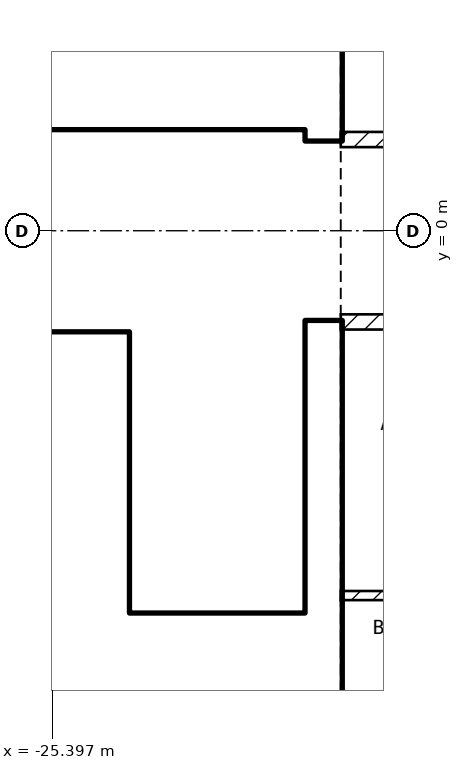
"""IFC4 building model, lengths in metres.
Left out: names, types, materials, properties, quantities, classifications, styles, units other than length and angle.
Written with IfcOpenShell. Run it as: python <this file> out.ifc"""

import sys

from ifc_helpers import new_model, si_unit, direction, frame, frame_2d, origin, place, context, subcontext, project, spatial, rectangle, extrude, element, fill, save


model = new_model("IFC4")
c1 = context("Model", 3, precision=1e-05, world=origin(), true_north=direction((0.0, 1.0)))
c2 = subcontext(c1, "Body", "Model", "MODEL_VIEW")
j1 = project(units=[si_unit("LENGTHUNIT", "METRE"), si_unit("PLANEANGLEUNIT", "RADIAN")], contexts=[c1])
p1 = place(None, origin())
s1 = spatial("IfcSite", under=j1, at=p1, CompositionType="ELEMENT")
p2 = place(p1, origin())
s2 = spatial("IfcBuilding", under=s1, at=p2, CompositionType="ELEMENT")
p3 = place(p2, frame((0.0, 0.0, 253.5)))
s3 = spatial("IfcBuildingStorey", under=s2, at=p3, CompositionType="ELEMENT", Elevation=253.5)
for number, where, z_axis, x_axis in (
    (1, (-21.825, -8.1, 0.0), (0.0, 0.0, 1.0), (0.0, 1.0, 0.0)),
    (2, (-21.825, 1.2, 0.0), (0.0, 0.0, 1.0), (0.0, 1.0, 0.0)),
):
    element("IfcWall", number, at=place(p3, frame(where, z_axis=z_axis, x_axis=x_axis)), inside=s3, PredefinedType="SHEAR", context=c2, shape_type="SweptSolid", body=[
        extrude(rectangle(XDim=6.9, YDim=0.45, at=frame_2d((3.45, 0.0))), origin(), (0.0, 0.0, 1.0), 3.25),
    ])
p4 = place(p3, frame((-33.35, 1.45, 0.0), z_axis=(0.0, 0.0, 1.0), x_axis=(1.0, 0.0, 0.0)))
e3 = element("IfcWall", 3, at=p4, inside=s3, PredefinedType="SOLIDWALL", context=c2, shape_type="SweptSolid", body=[
    extrude(rectangle(XDim=11.3, YDim=0.2, at=frame_2d((5.65, 0.0))), origin(), (0.0, 0.0, 1.0), 3.25),
])
p5 = place(p4, frame((9.55, 0.0, 0.0)))
e4 = element("IfcOpeningElement", 4, at=p5, cuts=e3, PredefinedType="OPENING", context=c2, shape_type="SweptSolid", body=[
    extrude(rectangle(XDim=1.0, YDim=2.1, at=frame_2d((0.5, 1.05))), frame((0.0, 0.11, 0.0), z_axis=(0.0, -1.0, 0.0), x_axis=(1.0, 0.0, 0.0)), (0.0, 0.0, 1.0), 0.22),
])
p6 = place(p4, frame((7.05, 0.0, 0.0)))
e5 = element("IfcOpeningElement", 5, at=p6, cuts=e3, PredefinedType="OPENING", context=c2, shape_type="SweptSolid", body=[
    extrude(rectangle(XDim=1.0, YDim=2.1, at=frame_2d((0.5, 1.05))), frame((0.0, 0.11, 0.0), z_axis=(0.0, -1.0, 0.0), x_axis=(1.0, 0.0, 0.0)), (0.0, 0.0, 1.0), 0.22),
])
p7 = place(p4, frame((1.175, 0.0, 0.0)))
e6 = element("IfcOpeningElement", 6, at=p7, cuts=e3, PredefinedType="OPENING", context=c2, shape_type="SweptSolid", body=[
    extrude(rectangle(XDim=0.9, YDim=2.1, at=frame_2d((0.45, 1.05))), frame((0.0, 0.11, 0.0), z_axis=(0.0, -1.0, 0.0), x_axis=(1.0, 0.0, 0.0)), (0.0, 0.0, 1.0), 0.22),
])
p8 = place(p3, frame((-24.5, -5.05, 0.0), z_axis=(0.0, 0.0, 1.0), x_axis=(0.0, 1.0, 0.0)))
e7 = element("IfcWall", 7, at=p8, inside=s3, PredefinedType="SOLIDWALL", context=c2, shape_type="SweptSolid", body=[
    extrude(rectangle(XDim=3.7, YDim=0.2, at=frame_2d((1.85, 0.0))), origin(), (0.0, 0.0, 1.0), 3.25),
])
p9 = place(p8, frame((0.1, 0.0, 0.0)))
e8 = element("IfcOpeningElement", 8, at=p9, cuts=e7, PredefinedType="OPENING", context=c2, shape_type="SweptSolid", body=[
    extrude(rectangle(XDim=0.8, YDim=2.1, at=frame_2d((0.4, 1.05))), frame((0.0, 0.11, 0.0), z_axis=(0.0, -1.0, 0.0), x_axis=(1.0, 0.0, 0.0)), (0.0, 0.0, 1.0), 0.22),
])
p10 = place(p3, frame((-28.35, -5.15, 0.0), z_axis=(0.0, 0.0, 1.0), x_axis=(1.0, 0.0, 0.0)))
e9 = element("IfcWall", 9, at=p10, inside=s3, PredefinedType="SOLIDWALL", context=c2, shape_type="SweptSolid", body=[
    extrude(rectangle(XDim=6.3, YDim=0.2, at=frame_2d((3.15, 0.0))), origin(), (0.0, 0.0, 1.0), 3.25),
])
p11 = place(p10, frame((5.1, 0.0, 0.0)))
e10 = element("IfcOpeningElement", 10, at=p11, cuts=e9, PredefinedType="OPENING", context=c2, shape_type="SweptSolid", body=[
    extrude(rectangle(XDim=1.0, YDim=2.1, at=frame_2d((0.5, 1.05))), frame((0.0, 0.11, 0.0), z_axis=(0.0, -1.0, 0.0), x_axis=(1.0, 0.0, 0.0)), (0.0, 0.0, 1.0), 0.22),
])
p12 = place(p3, frame((-33.35, -1.45, 0.0), z_axis=(0.0, 0.0, 1.0), x_axis=(1.0, 0.0, 0.0)))
e11 = element("IfcWall", 11, at=p12, inside=s3, PredefinedType="SOLIDWALL", context=c2, shape_type="SweptSolid", body=[
    extrude(rectangle(XDim=8.75, YDim=0.2, at=frame_2d((4.375, 0.0))), origin(), (0.0, 0.0, 1.0), 3.25),
])
p13 = place(p12, frame((7.35, 0.0, 0.0)))
e12 = element("IfcOpeningElement", 12, at=p13, cuts=e11, PredefinedType="OPENING", context=c2, shape_type="SweptSolid", body=[
    extrude(rectangle(XDim=1.0, YDim=2.1, at=frame_2d((0.5, 1.05))), frame((0.0, 0.11, 0.0), z_axis=(0.0, -1.0, 0.0), x_axis=(1.0, 0.0, 0.0)), (0.0, 0.0, 1.0), 0.22),
])
p14 = place(p12, frame((5.35, 0.0, 0.0)))
e13 = element("IfcOpeningElement", 13, at=p14, cuts=e11, PredefinedType="OPENING", context=c2, shape_type="SweptSolid", body=[
    extrude(rectangle(XDim=1.0, YDim=2.1, at=frame_2d((0.5, 1.05))), frame((0.0, 0.11, 0.0), z_axis=(0.0, -1.0, 0.0), x_axis=(1.0, 0.0, 0.0)), (0.0, 0.0, 1.0), 0.22),
])
p15 = place(p12, frame((3.35, 0.0, 0.0)))
e14 = element("IfcOpeningElement", 14, at=p15, cuts=e11, PredefinedType="OPENING", context=c2, shape_type="SweptSolid", body=[
    extrude(rectangle(XDim=1.0, YDim=2.1, at=frame_2d((0.5, 1.05))), frame((0.0, 0.11, 0.0), z_axis=(0.0, -1.0, 0.0), x_axis=(1.0, 0.0, 0.0)), (0.0, 0.0, 1.0), 0.22),
])
p16 = place(p12, frame((0.925, 0.0, 0.0)))
e15 = element("IfcOpeningElement", 15, at=p16, cuts=e11, PredefinedType="OPENING", context=c2, shape_type="SweptSolid", body=[
    extrude(rectangle(XDim=0.9, YDim=2.1, at=frame_2d((0.45, 1.05))), frame((0.0, 0.11, 0.0), z_axis=(0.0, -1.0, 0.0), x_axis=(1.0, 0.0, 0.0)), (0.0, 0.0, 1.0), 0.22),
])
p17 = place(p3, frame((-33.35, -3.95, 0.0), z_axis=(0.0, 0.0, 1.0), x_axis=(1.0, 0.0, 0.0)))
e16 = element("IfcWall", 16, at=p17, inside=s3, PredefinedType="SOLIDWALL", context=c2, shape_type="SweptSolid", body=[
    extrude(rectangle(XDim=8.75, YDim=0.2, at=frame_2d((4.375, 0.0))), origin(), (0.0, 0.0, 1.0), 3.25),
])
p18 = place(p3, frame((-21.6, 1.2, 0.0), z_axis=(0.0, 0.0, 1.0), x_axis=(1.0, 0.0, 0.0)))
e17 = element("IfcWall", 17, at=p18, inside=s3, PredefinedType="PARTITIONING", context=c2, shape_type="SweptSolid", body=[
    extrude(rectangle(XDim=17.2, YDim=0.2, at=frame_2d((8.6, 0.0))), origin(), (0.0, 0.0, 1.0), 3.25),
])
p19 = place(p18, frame((6.1, 0.0, 0.0)))
e18 = element("IfcOpeningElement", 18, at=p19, cuts=e17, PredefinedType="OPENING", context=c2, shape_type="SweptSolid", body=[
    extrude(rectangle(XDim=1.0, YDim=2.1, at=frame_2d((0.5, 1.05))), frame((0.0, 0.11, 0.0), z_axis=(0.0, -1.0, 0.0), x_axis=(1.0, 0.0, 0.0)), (0.0, 0.0, 1.0), 0.22),
])
p20 = place(p3, frame((-4.4, -1.2, 0.0), z_axis=(0.0, 0.0, 1.0), x_axis=(-1.0, 0.0, 0.0)))
e19 = element("IfcWall", 19, at=p20, inside=s3, PredefinedType="PARTITIONING", context=c2, shape_type="SweptSolid", body=[
    extrude(rectangle(XDim=17.2, YDim=0.2, at=frame_2d((8.6, 0.0))), origin(), (0.0, 0.0, 1.0), 3.25),
])
p21 = place(p20, frame((12.05, 0.0, 0.0)))
e20 = element("IfcOpeningElement", 20, at=p21, cuts=e19, PredefinedType="OPENING", context=c2, shape_type="SweptSolid", body=[
    extrude(rectangle(XDim=1.0, YDim=2.1, at=frame_2d((0.5, 1.05))), frame((0.0, 0.11, 0.0), z_axis=(0.0, -1.0, 0.0), x_axis=(1.0, 0.0, 0.0)), (0.0, 0.0, 1.0), 0.22),
])
p22 = place(p3, frame((-15.3, -4.8, 0.0), z_axis=(0.0, 0.0, 1.0), x_axis=(-1.0, 0.0, 0.0)))
e21 = element("IfcWall", 21, at=p22, inside=s3, PredefinedType="PARTITIONING", context=c2, shape_type="SweptSolid", body=[
    extrude(rectangle(XDim=6.3, YDim=0.12, at=frame_2d((3.15, 0.0))), origin(), (0.0, 0.0, 1.0), 3.25),
])
p23 = place(p22, frame((0.9, 0.0, 0.0)))
e22 = element("IfcOpeningElement", 22, at=p23, cuts=e21, PredefinedType="OPENING", context=c2, shape_type="SweptSolid", body=[
    extrude(rectangle(XDim=0.9, YDim=2.1, at=frame_2d((0.45, 1.05))), frame((0.0, 0.07, 0.0), z_axis=(0.0, -1.0, 0.0), x_axis=(1.0, 0.0, 0.0)), (0.0, 0.0, 1.0), 0.14),
])
p24 = place(p13, origin())
e23 = element("IfcDoor", 23, at=p24, inside=s3, OperationType="DOUBLE_DOOR_SLIDING", PredefinedType="DOOR", context=c2, shape_type="SweptSolid", body=[
    extrude(rectangle(XDim=1.0, YDim=2.1, at=frame_2d((0.5, 1.05))), frame((0.0, 0.025, 0.0), z_axis=(0.0, -1.0, 0.0), x_axis=(1.0, 0.0, 0.0)), (0.0, 0.0, 1.0), 0.05),
])
fill(e12, e23)
p25 = place(p11, origin())
e24 = element("IfcDoor", 24, at=p25, inside=s3, OperationType="SINGLE_SWING_LEFT", PredefinedType="DOOR", context=c2, shape_type="SweptSolid", body=[
    extrude(rectangle(XDim=1.0, YDim=2.1, at=frame_2d((0.5, 1.05))), frame((0.0, 0.025, 0.0), z_axis=(0.0, -1.0, 0.0), x_axis=(1.0, 0.0, 0.0)), (0.0, 0.0, 1.0), 0.05),
])
fill(e10, e24)
p26 = place(p5, origin())
e25 = element("IfcDoor", 25, at=p26, inside=s3, OperationType="SINGLE_SWING_LEFT", PredefinedType="DOOR", context=c2, shape_type="SweptSolid", body=[
    extrude(rectangle(XDim=1.0, YDim=2.1, at=frame_2d((0.5, 1.05))), frame((0.0, 0.025, 0.0), z_axis=(0.0, -1.0, 0.0), x_axis=(1.0, 0.0, 0.0)), (0.0, 0.0, 1.0), 0.05),
])
fill(e4, e25)
p27 = place(p9, origin())
e26 = element("IfcDoor", 26, at=p27, inside=s3, OperationType="SINGLE_SWING_LEFT", PredefinedType="DOOR", context=c2, shape_type="SweptSolid", body=[
    extrude(rectangle(XDim=0.8, YDim=2.1, at=frame_2d((0.4, 1.05))), frame((0.0, 0.025, 0.0), z_axis=(0.0, -1.0, 0.0), x_axis=(1.0, 0.0, 0.0)), (0.0, 0.0, 1.0), 0.05),
])
fill(e8, e26)
p28 = place(p6, origin())
e27 = element("IfcDoor", 27, at=p28, inside=s3, OperationType="SINGLE_SWING_LEFT", PredefinedType="DOOR", context=c2, shape_type="SweptSolid", body=[
    extrude(rectangle(XDim=1.0, YDim=2.1, at=frame_2d((0.5, 1.05))), frame((0.0, 0.025, 0.0), z_axis=(0.0, -1.0, 0.0), x_axis=(1.0, 0.0, 0.0)), (0.0, 0.0, 1.0), 0.05),
])
fill(e5, e27)
save(model, sys.argv[1])
